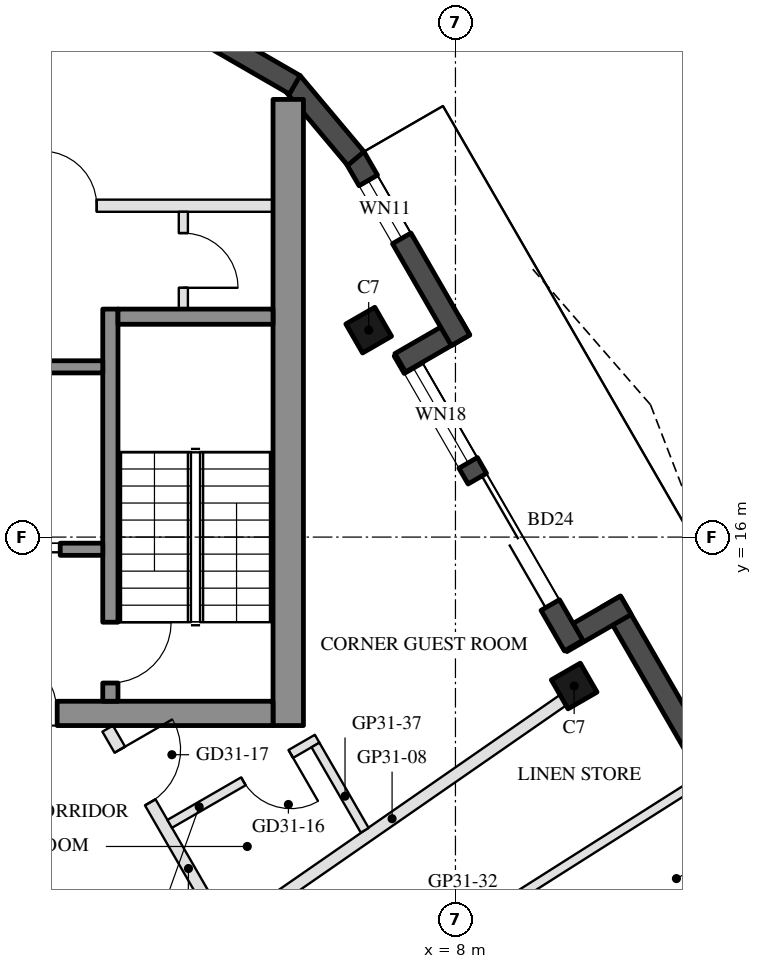
"""IFC4 building model, lengths in metres.
Left out: names, types, materials, properties, quantities, classifications, styles, units other than length and angle.
Written with IfcOpenShell. Run it as: python <this file> out.ifc"""

import sys

from ifc_helpers import new_model, si_unit, direction, frame, frame_2d, origin, origin_2d, place, context, subcontext, project, spatial, rectangle, hollow_rectangle, extrude, boolean, halfspace, element, fill, save


model = new_model("IFC4")
c1 = context("Model", 3, precision=1e-05, world=origin(), true_north=direction((0.0, 1.0)))
c2 = subcontext(c1, "Body", "Model", "MODEL_VIEW")
j1 = project(units=[si_unit("LENGTHUNIT", "METRE"), si_unit("PLANEANGLEUNIT", "RADIAN")], contexts=[c1])
p1 = place(None, origin())
s1 = spatial("IfcSite", under=j1, at=p1, CompositionType="ELEMENT")
p2 = place(p1, origin())
s2 = spatial("IfcBuilding", under=s1, at=p2, CompositionType="ELEMENT")
p3 = place(p2, frame((0.0, 0.0, 305.9)))
s3 = spatial("IfcBuildingStorey", under=s2, at=p3, CompositionType="ELEMENT", Elevation=305.9)
p4 = place(p3, frame((9.953, 13.551, 0.0), z_axis=(0.0, 0.0, 1.0), x_axis=(-0.5, 0.866025403784, 0.0)))
e1 = element("IfcColumn", 1, at=p4, inside=s3, PredefinedType="COLUMN", context=c2, shape_type="SweptSolid", body=[
    boolean("DIFFERENCE", extrude(hollow_rectangle(XDim=0.55, YDim=0.55, WallThickness=0.025, at=origin_2d()), origin(), (0.0, 0.0, 1.0), 3.7), halfspace(frame((0.0, 0.0, 3.666), z_axis=(0.0, 0.0, 1.0), x_axis=(1.0, 0.0, 0.0)), False)),
])
p5 = place(p3, frame((6.573, 19.404, 0.0), z_axis=(0.0, 0.0, 1.0), x_axis=(-0.5, 0.866025403784, 0.0)))
e2 = element("IfcColumn", 2, at=p5, inside=s3, PredefinedType="COLUMN", context=c2, shape_type="SweptSolid", body=[
    boolean("DIFFERENCE", extrude(hollow_rectangle(XDim=0.55, YDim=0.55, WallThickness=0.025, at=origin_2d()), origin(), (0.0, 0.0, 1.0), 3.7), halfspace(frame((0.0, 0.0, 3.66), z_axis=(0.0, 0.0, 1.0), x_axis=(1.0, 0.0, 0.0)), False)),
])
p6 = place(p3, frame((14.843, 7.531, 0.0), z_axis=(0.0, 0.0, 1.0), x_axis=(-0.500013816581, 0.866017426631, 0.0)))
e3 = element("IfcWall", 3, at=p6, inside=s3, PredefinedType="SOLIDWALL", context=c2, shape_type="SweptSolid", body=[
    extrude(rectangle(XDim=8.559, YDim=0.35, at=frame_2d((4.279, 0.0))), origin(), (0.0, 0.0, 1.0), 3.55),
])
p7 = place(p6, frame((1.525, 0.0, 0.3)))
e4 = element("IfcOpeningElement", 4, at=p7, cuts=e3, PredefinedType="OPENING", context=c2, shape_type="SweptSolid", body=[
    extrude(rectangle(XDim=0.9, YDim=2.65, at=frame_2d((0.45, 1.325))), frame((0.0, 0.185, 0.0), z_axis=(0.0, -1.0, 0.0), x_axis=(1.0, 0.0, 0.0)), (0.0, 0.0, 1.0), 0.37),
])
p8 = place(p3, frame((10.802, 14.879, 0.0), z_axis=(0.0, 0.0, 1.0), x_axis=(-0.866005645448, -0.500034220881, 0.0)))
e5 = element("IfcWall", 5, at=p8, inside=s3, PredefinedType="SOLIDWALL", context=c2, shape_type="SweptSolid", body=[
    extrude(rectangle(XDim=1.22, YDim=0.35, at=frame_2d((0.61, 0.0))), origin(), (0.0, 0.0, 1.0), 3.55),
])
p9 = place(p3, frame((9.944, 14.216, 0.0), z_axis=(0.0, 0.0, 1.0), x_axis=(-0.500026936782, 0.866009851268, 0.0)))
e6 = element("IfcWall", 6, at=p9, inside=s3, PredefinedType="SOLIDWALL", context=c2, shape_type="SweptSolid", body=[
    extrude(rectangle(XDim=5.599, YDim=0.35, at=frame_2d((2.799, 0.0))), origin(), (0.0, 0.0, 1.0), 3.55),
])
p10 = place(p9, frame((0.77, 0.0, 0.0)))
e7 = element("IfcOpeningElement", 7, at=p10, cuts=e6, PredefinedType="OPENING", context=c2, shape_type="SweptSolid", body=[
    extrude(rectangle(XDim=2.4, YDim=2.4, at=frame_2d((1.2, 1.2))), frame((0.0, 0.185, 0.0), z_axis=(0.0, -1.0, 0.0), x_axis=(1.0, 0.0, 0.0)), (0.0, 0.0, 1.0), 0.37),
])
p11 = place(p9, frame((3.47, 0.0, 0.3)))
e8 = element("IfcOpeningElement", 8, at=p11, cuts=e6, PredefinedType="OPENING", context=c2, shape_type="SweptSolid", body=[
    extrude(rectangle(XDim=1.8, YDim=2.65, at=frame_2d((0.9, 1.325))), frame((0.0, 0.185, 0.0), z_axis=(0.0, -1.0, 0.0), x_axis=(1.0, 0.0, 0.0)), (0.0, 0.0, 1.0), 0.37),
])
p12 = place(p3, frame((7.092, 18.866, 0.0), z_axis=(0.0, 0.0, 1.0), x_axis=(0.866005645448, 0.500034220881, 0.0)))
e9 = element("IfcWall", 9, at=p12, inside=s3, PredefinedType="SOLIDWALL", context=c2, shape_type="SweptSolid", body=[
    extrude(rectangle(XDim=1.22, YDim=0.35, at=frame_2d((0.61, 0.0))), origin(), (0.0, 0.0, 1.0), 3.55),
])
p13 = place(p3, frame((8.084, 19.237, 0.0), z_axis=(0.0, 0.0, 1.0), x_axis=(-0.499949154193, 0.866054757635, 0.0)))
e10 = element("IfcWall", 10, at=p13, inside=s3, PredefinedType="SOLIDWALL", context=c2, shape_type="SweptSolid", body=[
    extrude(rectangle(XDim=3.48, YDim=0.35, at=frame_2d((1.74, 0.0))), origin(), (0.0, 0.0, 1.0), 3.55),
])
p14 = place(p13, frame((1.935, 0.0, 0.3)))
e11 = element("IfcOpeningElement", 11, at=p14, cuts=e10, PredefinedType="OPENING", context=c2, shape_type="SweptSolid", body=[
    extrude(rectangle(XDim=1.1, YDim=2.65, at=frame_2d((0.55, 1.325))), frame((0.0, 0.185, 0.0), z_axis=(0.0, -1.0, 0.0), x_axis=(1.0, 0.0, 0.0)), (0.0, 0.0, 1.0), 0.37),
])
p15 = place(p3, frame((6.361, 22.226, 0.0), z_axis=(0.0, 0.0, 1.0), x_axis=(-0.642782014883, 0.766049137682, 0.0)))
e12 = element("IfcWall", 12, at=p15, inside=s3, PredefinedType="SOLIDWALL", context=c2, shape_type="SweptSolid", body=[
    extrude(rectangle(XDim=1.634, YDim=0.35, at=frame_2d((0.817, 0.0))), origin(), (0.0, 0.0, 1.0), 3.55),
])
p16 = place(p3, frame((5.358, 23.439, 0.0), z_axis=(0.0, 0.0, 1.0), x_axis=(-0.866018903231, 0.500011259119, 0.0)))
e13 = element("IfcWall", 13, at=p16, inside=s3, PredefinedType="SOLIDWALL", context=c2, shape_type="SweptSolid", body=[
    extrude(rectangle(XDim=1.634, YDim=0.35, at=frame_2d((0.817, 0.0))), origin(), (0.0, 0.0, 1.0), 3.55),
])
p17 = place(p3, frame((5.25, 12.9, 0.0), z_axis=(0.0, 0.0, 1.0), x_axis=(0.0, 1.0, 0.0)))
e14 = element("IfcWall", 14, at=p17, inside=s3, PredefinedType="SHEAR", context=c2, shape_type="SweptSolid", body=[
    extrude(rectangle(XDim=10.299, YDim=0.5, at=frame_2d((5.149, 0.0))), origin(), (0.0, 0.0, 1.0), 3.5),
])
p18 = place(p3, frame((5.0, 13.1, 0.0), z_axis=(0.0, 0.0, 1.0), x_axis=(-1.0, 0.0, 0.0)))
e15 = element("IfcWall", 15, at=p18, inside=s3, PredefinedType="SHEAR", context=c2, shape_type="SweptSolid", body=[
    extrude(rectangle(XDim=10.0, YDim=0.4, at=frame_2d((5.0, 0.0))), origin(), (0.0, 0.0, 1.0), 3.5),
])
p19 = place(p18, frame((3.55, 0.0, 0.0)))
e16 = element("IfcOpeningElement", 16, at=p19, cuts=e15, PredefinedType="OPENING", context=c2, shape_type="SweptSolid", body=[
    extrude(rectangle(XDim=1.1, YDim=2.1, at=frame_2d((0.55, 1.05))), frame((0.0, 0.21, 0.0), z_axis=(0.0, -1.0, 0.0), x_axis=(1.0, 0.0, 0.0)), (0.0, 0.0, 1.0), 0.42),
])
p20 = place(p18, frame((5.85, 0.0, 0.0)))
e17 = element("IfcOpeningElement", 17, at=p20, cuts=e15, PredefinedType="OPENING", context=c2, shape_type="SweptSolid", body=[
    extrude(rectangle(XDim=1.4, YDim=2.1, at=frame_2d((0.7, 1.05))), frame((0.0, 0.21, 0.0), z_axis=(0.0, -1.0, 0.0), x_axis=(1.0, 0.0, 0.0)), (0.0, 0.0, 1.0), 0.42),
])
p21 = place(p3, frame((2.325, 13.3, 0.0), z_axis=(0.0, 0.0, 1.0), x_axis=(0.0, 1.0, 0.0)))
e18 = element("IfcWall", 18, at=p21, inside=s3, PredefinedType="SHEAR", context=c2, shape_type="SweptSolid", body=[
    extrude(rectangle(XDim=6.45, YDim=0.25, at=frame_2d((3.225, 0.0))), origin(), (0.0, 0.0, 1.0), 3.5),
])
p22 = place(p21, frame((0.3, 0.0, 0.0)))
e19 = element("IfcOpeningElement", 19, at=p22, cuts=e18, PredefinedType="OPENING", context=c2, shape_type="SweptSolid", body=[
    extrude(rectangle(XDim=1.0, YDim=2.1, at=frame_2d((0.5, 1.05))), frame((0.0, 0.135, 0.0), z_axis=(0.0, -1.0, 0.0), x_axis=(1.0, 0.0, 0.0)), (0.0, 0.0, 1.0), 0.27),
])
p23 = place(p3, frame((5.0, 19.625, 0.0), z_axis=(0.0, 0.0, 1.0), x_axis=(-1.0, 0.0, 0.0)))
e20 = element("IfcWall", 20, at=p23, inside=s3, PredefinedType="SHEAR", context=c2, shape_type="SweptSolid", body=[
    extrude(rectangle(XDim=2.55, YDim=0.25, at=frame_2d((1.275, 0.0))), origin(), (0.0, 0.0, 1.0), 3.5),
])
p24 = place(p3, frame((2.2, 18.8, 0.0), z_axis=(0.0, 0.0, 1.0), x_axis=(-1.0, 0.0, 0.0)))
e21 = element("IfcWall", 21, at=p24, inside=s3, PredefinedType="SHEAR", context=c2, shape_type="SweptSolid", body=[
    extrude(rectangle(XDim=2.8, YDim=0.2, at=frame_2d((1.4, 0.0))), origin(), (0.0, 0.0, 1.0), 3.5),
])
p25 = place(p3, frame((2.2, 15.8, 0.0), z_axis=(0.0, 0.0, 1.0), x_axis=(-1.0, 0.0, 0.0)))
e22 = element("IfcWall", 22, at=p25, inside=s3, PredefinedType="SHEAR", context=c2, shape_type="SweptSolid", body=[
    extrude(rectangle(XDim=2.8, YDim=0.2, at=frame_2d((1.4, 0.0))), origin(), (0.0, 0.0, 1.0), 3.5),
])
p26 = place(p25, frame((0.7, 0.0, 0.0)))
e23 = element("IfcOpeningElement", 23, at=p26, cuts=e22, PredefinedType="OPENING", context=c2, shape_type="SweptSolid", body=[
    extrude(rectangle(XDim=1.2, YDim=2.1, at=frame_2d((0.6, 1.05))), frame((0.0, 0.11, 0.0), z_axis=(0.0, -1.0, 0.0), x_axis=(1.0, 0.0, 0.0)), (0.0, 0.0, 1.0), 0.22),
])
p27 = place(p3, frame((5.0, 21.45, 0.0), z_axis=(0.0, 0.0, 1.0), x_axis=(-1.0, 0.0, 0.0)))
e24 = element("IfcWall", 24, at=p27, inside=s3, PredefinedType="PARTITIONING", context=c2, shape_type="SweptSolid", body=[
    extrude(rectangle(XDim=5.4, YDim=0.2, at=frame_2d((2.7, 0.0))), origin(), (0.0, 0.0, 1.0), 3.5),
])
p28 = place(p27, frame((2.9, 0.0, 0.0)))
e25 = element("IfcOpeningElement", 25, at=p28, cuts=e24, PredefinedType="OPENING", context=c2, shape_type="SweptSolid", body=[
    extrude(rectangle(XDim=0.9, YDim=2.1, at=frame_2d((0.45, 1.05))), frame((0.0, 0.11, 0.0), z_axis=(0.0, -1.0, 0.0), x_axis=(1.0, 0.0, 0.0)), (0.0, 0.0, 1.0), 0.22),
])
p29 = place(p3, frame((3.525, 19.75, 0.0), z_axis=(0.0, 0.0, 1.0), x_axis=(0.0, 1.0, 0.0)))
e26 = element("IfcWall", 26, at=p29, inside=s3, PredefinedType="PARTITIONING", context=c2, shape_type="SweptSolid", body=[
    extrude(rectangle(XDim=1.6, YDim=0.15, at=frame_2d((0.8, 0.0))), origin(), (0.0, 0.0, 1.0), 3.5),
])
p30 = place(p29, frame((0.35, 0.0, 0.0)))
e27 = element("IfcOpeningElement", 27, at=p30, cuts=e26, PredefinedType="OPENING", context=c2, shape_type="SweptSolid", body=[
    extrude(rectangle(XDim=0.9, YDim=2.1, at=frame_2d((0.45, 1.05))), frame((0.0, 0.085, 0.0), z_axis=(0.0, -1.0, 0.0), x_axis=(1.0, 0.0, 0.0)), (0.0, 0.0, 1.0), 0.17),
])
p31 = place(p3, frame((9.769, 13.318, 0.0), z_axis=(0.0, 0.0, 1.0), x_axis=(-0.821728251777, -0.569879531332, 0.0)))
e28 = element("IfcWall", 28, at=p31, inside=s3, PredefinedType="PARTITIONING", context=c2, shape_type="SweptSolid", body=[
    extrude(rectangle(XDim=6.843, YDim=0.2, at=frame_2d((3.421, 0.0))), origin(), (0.0, 0.0, 1.0), 3.1),
])
p32 = place(p3, frame((12.052, 12.015, 0.0), z_axis=(0.0, 0.0, 1.0), x_axis=(-0.844566720388, -0.535450328987, 0.0)))
e29 = element("IfcWall", 29, at=p32, inside=s3, PredefinedType="PARTITIONING", context=c2, shape_type="SweptSolid", body=[
    extrude(rectangle(XDim=8.152, YDim=0.15, at=frame_2d((4.076, 0.0))), origin(), (0.0, 0.0, 1.0), 3.1),
])
p33 = place(p3, frame((2.281, 12.85, 0.0), z_axis=(0.0, 0.0, 1.0), x_axis=(0.500019354728, -0.866014229038, 0.0)))
e30 = element("IfcWall", 30, at=p33, inside=s3, PredefinedType="PARTITIONING", context=c2, shape_type="SweptSolid", body=[
    extrude(rectangle(XDim=3.796, YDim=0.2, at=frame_2d((1.898, 0.0))), origin(), (0.0, 0.0, 1.0), 3.1),
])
p34 = place(p33, frame((0.4, 0.0, 0.0)))
e31 = element("IfcOpeningElement", 31, at=p34, cuts=e30, PredefinedType="OPENING", context=c2, shape_type="SweptSolid", body=[
    extrude(rectangle(XDim=1.0, YDim=2.1, at=frame_2d((0.5, 1.05))), frame((0.0, 0.11, 0.0), z_axis=(0.0, -1.0, 0.0), x_axis=(1.0, 0.0, 0.0)), (0.0, 0.0, 1.0), 0.22),
])
p35 = place(p3, frame((5.725, 12.683, 0.0), z_axis=(0.0, 0.0, 1.0), x_axis=(-0.866034573852, -0.49998411664, 0.0)))
e32 = element("IfcWall", 32, at=p35, inside=s3, PredefinedType="PARTITIONING", context=c2, shape_type="SweptSolid", body=[
    extrude(rectangle(XDim=2.8, YDim=0.15, at=frame_2d((1.4, 0.0))), origin(), (0.0, 0.0, 1.0), 3.55),
])
p36 = place(p35, frame((0.5, 0.0, 0.0)))
e33 = element("IfcOpeningElement", 33, at=p36, cuts=e32, PredefinedType="OPENING", context=c2, shape_type="SweptSolid", body=[
    extrude(rectangle(XDim=0.9, YDim=2.1, at=frame_2d((0.45, 1.05))), frame((0.0, 0.085, 0.0), z_axis=(0.0, -1.0, 0.0), x_axis=(1.0, 0.0, 0.0)), (0.0, 0.0, 1.0), 0.17),
])
p37 = place(p3, frame((6.508, 11.178, 0.0), z_axis=(0.0, 0.0, 1.0), x_axis=(-0.500061642096, 0.865989811779, 0.0)))
e34 = element("IfcWall", 34, at=p37, inside=s3, PredefinedType="PARTITIONING", context=c2, shape_type="SweptSolid", body=[
    extrude(rectangle(XDim=1.62, YDim=0.15, at=frame_2d((0.81, 0.0))), origin(), (0.0, 0.0, 1.0), 3.1),
])
p38 = place(p10, frame((2.4, 0.0, 0.0), z_axis=(0.0, 0.0, 1.0), x_axis=(-1.0, 0.0, 0.0)))
e35 = element("IfcDoor", 35, at=p38, inside=s3, OperationType="SLIDING_TO_LEFT", PredefinedType="DOOR", context=c2, shape_type="SweptSolid", body=[
    extrude(rectangle(XDim=2.4, YDim=2.4, at=frame_2d((1.2, 1.2))), frame((0.0, 0.025, 0.0), z_axis=(0.0, -1.0, 0.0), x_axis=(1.0, 0.0, 0.0)), (0.0, 0.0, 1.0), 0.05),
])
fill(e7, e35)
p39 = place(p11, origin())
e36 = element("IfcWindow", 36, at=p39, inside=s3, PartitioningType="SINGLE_PANEL", PredefinedType="WINDOW", context=c2, shape_type="SweptSolid", body=[
    extrude(rectangle(XDim=1.8, YDim=2.65, at=frame_2d((0.9, 1.325))), frame((0.0, 0.03, 0.0), z_axis=(0.0, -1.0, 0.0), x_axis=(1.0, 0.0, 0.0)), (0.0, 0.0, 1.0), 0.06),
])
fill(e8, e36)
p40 = place(p14, origin())
e37 = element("IfcWindow", 37, at=p40, inside=s3, PartitioningType="SINGLE_PANEL", PredefinedType="WINDOW", context=c2, shape_type="SweptSolid", body=[
    extrude(rectangle(XDim=1.1, YDim=2.65, at=frame_2d((0.55, 1.325))), frame((0.0, 0.03, 0.0), z_axis=(0.0, -1.0, 0.0), x_axis=(1.0, 0.0, 0.0)), (0.0, 0.0, 1.0), 0.06),
])
fill(e11, e37)
p41 = place(p26, origin())
e38 = element("IfcDoor", 38, at=p41, inside=s3, OperationType="DOUBLE_DOOR_SLIDING", PredefinedType="DOOR", context=c2, shape_type="SweptSolid", body=[
    extrude(rectangle(XDim=1.2, YDim=2.1, at=frame_2d((0.6, 1.05))), frame((0.0, 0.025, 0.0), z_axis=(0.0, -1.0, 0.0), x_axis=(1.0, 0.0, 0.0)), (0.0, 0.0, 1.0), 0.05),
])
fill(e23, e38)
p42 = place(p30, frame((0.9, 0.0, 0.0), z_axis=(0.0, 0.0, 1.0), x_axis=(-1.0, 0.0, 0.0)))
e39 = element("IfcDoor", 39, at=p42, inside=s3, OperationType="SINGLE_SWING_RIGHT", PredefinedType="DOOR", context=c2, shape_type="SweptSolid", body=[
    extrude(rectangle(XDim=0.9, YDim=2.1, at=frame_2d((0.45, 1.05))), frame((0.0, 0.025, 0.0), z_axis=(0.0, -1.0, 0.0), x_axis=(1.0, 0.0, 0.0)), (0.0, 0.0, 1.0), 0.05),
])
fill(e27, e39)
p43 = place(p28, frame((0.9, 0.0, 0.0), z_axis=(0.0, 0.0, 1.0), x_axis=(-1.0, 0.0, 0.0)))
e40 = element("IfcDoor", 40, at=p43, inside=s3, OperationType="SINGLE_SWING_LEFT", PredefinedType="DOOR", context=c2, shape_type="SweptSolid", body=[
    extrude(rectangle(XDim=0.9, YDim=2.1, at=frame_2d((0.45, 1.05))), frame((0.0, 0.025, 0.0), z_axis=(0.0, -1.0, 0.0), x_axis=(1.0, 0.0, 0.0)), (0.0, 0.0, 1.0), 0.05),
])
fill(e25, e40)
p44 = place(p19, frame((1.1, 0.0, 0.0), z_axis=(0.0, 0.0, 1.0), x_axis=(-1.0, 0.0, 0.0)))
e41 = element("IfcDoor", 41, at=p44, inside=s3, OperationType="SINGLE_SWING_LEFT", PredefinedType="DOOR", context=c2, shape_type="SweptSolid", body=[
    extrude(rectangle(XDim=1.1, YDim=2.1, at=frame_2d((0.55, 1.05))), frame((0.0, 0.025, 0.0), z_axis=(0.0, -1.0, 0.0), x_axis=(1.0, 0.0, 0.0)), (0.0, 0.0, 1.0), 0.05),
])
fill(e16, e41)
p45 = place(p22, frame((1.0, 0.0, 0.0), z_axis=(0.0, 0.0, 1.0), x_axis=(-1.0, 0.0, 0.0)))
e42 = element("IfcDoor", 42, at=p45, inside=s3, OperationType="SINGLE_SWING_LEFT", PredefinedType="DOOR", context=c2, shape_type="SweptSolid", body=[
    extrude(rectangle(XDim=1.0, YDim=2.1, at=frame_2d((0.5, 1.05))), frame((0.0, 0.025, 0.0), z_axis=(0.0, -1.0, 0.0), x_axis=(1.0, 0.0, 0.0)), (0.0, 0.0, 1.0), 0.05),
])
fill(e19, e42)
p46 = place(p36, origin())
e43 = element("IfcDoor", 43, at=p46, inside=s3, OperationType="SINGLE_SWING_LEFT", PredefinedType="DOOR", context=c2, shape_type="SweptSolid", body=[
    extrude(rectangle(XDim=0.9, YDim=2.1, at=frame_2d((0.45, 1.05))), frame((0.0, 0.025, 0.0), z_axis=(0.0, -1.0, 0.0), x_axis=(1.0, 0.0, 0.0)), (0.0, 0.0, 1.0), 0.05),
])
fill(e33, e43)
p47 = place(p34, origin())
e44 = element("IfcDoor", 44, at=p47, inside=s3, OperationType="SINGLE_SWING_LEFT", PredefinedType="DOOR", context=c2, shape_type="SweptSolid", body=[
    extrude(rectangle(XDim=1.0, YDim=2.1, at=frame_2d((0.5, 1.05))), frame((0.0, 0.025, 0.0), z_axis=(0.0, -1.0, 0.0), x_axis=(1.0, 0.0, 0.0)), (0.0, 0.0, 1.0), 0.05),
])
fill(e31, e44)
save(model, sys.argv[1])
